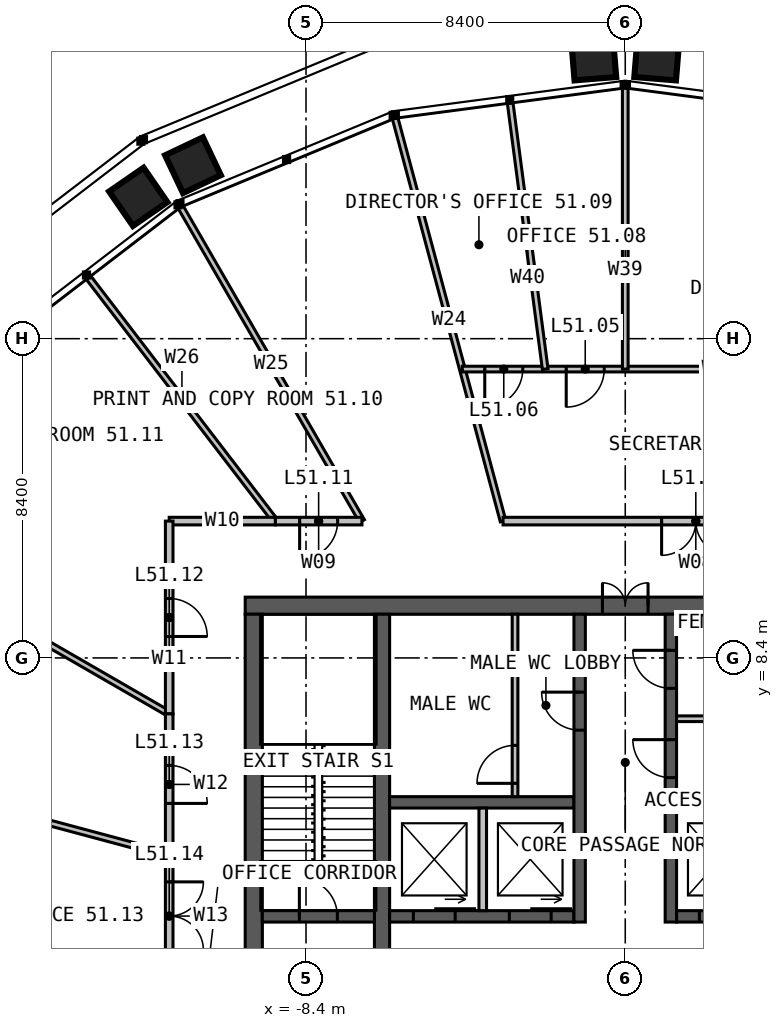
"""IFC4 building model, lengths in metres.
Left out: names, types, materials, properties, quantities, classifications, styles, units other than length and angle.
Written with IfcOpenShell. Run it as: python <this file> out.ifc"""

import sys

from ifc_helpers import new_model, si_unit, direction, frame, frame_2d, origin, place, context, subcontext, project, spatial, rectangle, extrude, element, fill, save


model = new_model("IFC4")
c1 = context("Model", 3, precision=1e-05, world=origin(), true_north=direction((0.0, 1.0)))
c2 = subcontext(c1, "Body", "Model", "MODEL_VIEW")
j1 = project(units=[si_unit("LENGTHUNIT", "METRE"), si_unit("PLANEANGLEUNIT", "RADIAN")], contexts=[c1])
p1 = place(None, origin())
s1 = spatial("IfcSite", under=j1, at=p1, CompositionType="ELEMENT")
p2 = place(p1, origin())
s2 = spatial("IfcBuilding", under=s1, at=p2, CompositionType="ELEMENT")
p3 = place(p2, frame((0.0, 0.0, 211.0)))
s3 = spatial("IfcBuildingStorey", under=s2, at=p3, CompositionType="ELEMENT", Elevation=211.0)
p4 = place(p3, frame((-10.0, 9.775, 0.0), z_axis=(0.0, 0.0, 1.0), x_axis=(1.0, 0.0, 0.0)))
e1 = element("IfcWall", 1, at=p4, inside=s3, PredefinedType="SOLIDWALL", context=c2, shape_type="SweptSolid", body=[
    extrude(rectangle(XDim=20.0, YDim=0.45, at=frame_2d((10.0, 0.0))), origin(), (0.0, 0.0, 1.0), 4.0),
])
p5 = place(p4, frame((9.4, 0.0, 0.0)))
e2 = element("IfcOpeningElement", 2, at=p5, cuts=e1, PredefinedType="OPENING", context=c2, shape_type="SweptSolid", body=[
    extrude(rectangle(XDim=1.2, YDim=2.2, at=frame_2d((0.6, 1.1))), frame((0.0, 0.235, 0.0), z_axis=(0.0, -1.0, 0.0), x_axis=(1.0, 0.0, 0.0)), (0.0, 0.0, 1.0), 0.47),
])
p6 = place(p3, frame((-9.775, 9.55, 0.0), z_axis=(0.0, 0.0, 1.0), x_axis=(0.0, -1.0, 0.0)))
e3 = element("IfcWall", 3, at=p6, inside=s3, PredefinedType="SOLIDWALL", context=c2, shape_type="SweptSolid", body=[
    extrude(rectangle(XDim=19.1, YDim=0.45, at=frame_2d((9.55, 0.0))), origin(), (0.0, 0.0, 1.0), 4.0),
])
p7 = place(p3, frame((-6.4, -9.55, 0.0), z_axis=(0.0, 0.0, 1.0), x_axis=(0.0, 1.0, 0.0)))
e4 = element("IfcWall", 4, at=p7, inside=s3, PredefinedType="SOLIDWALL", context=c2, shape_type="SweptSolid", body=[
    extrude(rectangle(XDim=19.1, YDim=0.4, at=frame_2d((9.55, 0.0))), origin(), (0.0, 0.0, 1.0), 4.0),
])
p8 = place(p7, frame((9.05, 0.0, 0.0)))
e5 = element("IfcOpeningElement", 5, at=p8, cuts=e4, PredefinedType="OPENING", context=c2, shape_type="SweptSolid", body=[
    extrude(rectangle(XDim=1.0, YDim=2.2, at=frame_2d((0.5, 1.1))), frame((0.0, 0.21, 0.0), z_axis=(0.0, -1.0, 0.0), x_axis=(1.0, 0.0, 0.0)), (0.0, 0.0, 1.0), 0.42),
])
p9 = place(p3, frame((-6.2, 1.6, 0.0), z_axis=(0.0, 0.0, 1.0), x_axis=(1.0, 0.0, 0.0)))
e6 = element("IfcWall", 6, at=p9, inside=s3, PredefinedType="SOLIDWALL", context=c2, shape_type="SweptSolid", body=[
    extrude(rectangle(XDim=4.85, YDim=0.3, at=frame_2d((2.425, 0.0))), origin(), (0.0, 0.0, 1.0), 4.0),
])
p10 = place(p9, frame((0.625, 0.0, 0.0)))
e7 = element("IfcOpeningElement", 7, at=p10, cuts=e6, PredefinedType="OPENING", context=c2, shape_type="SweptSolid", body=[
    extrude(rectangle(XDim=1.1, YDim=2.2, at=frame_2d((0.55, 1.1))), frame((0.0, 0.16, 0.0), z_axis=(0.0, -1.0, 0.0), x_axis=(1.0, 0.0, 0.0)), (0.0, 0.0, 1.0), 0.32),
])
p11 = place(p9, frame((3.15, 0.0, 0.0)))
e8 = element("IfcOpeningElement", 8, at=p11, cuts=e6, PredefinedType="OPENING", context=c2, shape_type="SweptSolid", body=[
    extrude(rectangle(XDim=1.1, YDim=2.2, at=frame_2d((0.55, 1.1))), frame((0.0, 0.16, 0.0), z_axis=(0.0, -1.0, 0.0), x_axis=(1.0, 0.0, 0.0)), (0.0, 0.0, 1.0), 0.32),
])
p12 = place(p3, frame((1.35, 1.6, 0.0), z_axis=(0.0, 0.0, 1.0), x_axis=(1.0, 0.0, 0.0)))
e9 = element("IfcWall", 9, at=p12, inside=s3, PredefinedType="SOLIDWALL", context=c2, shape_type="SweptSolid", body=[
    extrude(rectangle(XDim=4.85, YDim=0.3, at=frame_2d((2.425, 0.0))), origin(), (0.0, 0.0, 1.0), 4.0),
])
p13 = place(p12, frame((0.6, 0.0, 0.0)))
e10 = element("IfcOpeningElement", 10, at=p13, cuts=e9, PredefinedType="OPENING", context=c2, shape_type="SweptSolid", body=[
    extrude(rectangle(XDim=1.1, YDim=2.2, at=frame_2d((0.55, 1.1))), frame((0.0, 0.16, 0.0), z_axis=(0.0, -1.0, 0.0), x_axis=(1.0, 0.0, 0.0)), (0.0, 0.0, 1.0), 0.32),
])
p14 = place(p12, frame((3.125, 0.0, 0.0)))
e11 = element("IfcOpeningElement", 11, at=p14, cuts=e9, PredefinedType="OPENING", context=c2, shape_type="SweptSolid", body=[
    extrude(rectangle(XDim=1.1, YDim=2.2, at=frame_2d((0.55, 1.1))), frame((0.0, 0.16, 0.0), z_axis=(0.0, -1.0, 0.0), x_axis=(1.0, 0.0, 0.0)), (0.0, 0.0, 1.0), 0.32),
])
for number, where, z_axis, x_axis in (
    (12, (-6.2, 4.6, 0.0), (0.0, 0.0, 1.0), (1.0, 0.0, 0.0)),
    (13, (1.35, 4.6, 0.0), (0.0, 0.0, 1.0), (1.0, 0.0, 0.0)),
):
    element("IfcWall", number, at=place(p3, frame(where, z_axis=z_axis, x_axis=x_axis)), inside=s3, PredefinedType="SOLIDWALL", context=c2, shape_type="SweptSolid", body=[
        extrude(rectangle(XDim=4.85, YDim=0.3, at=frame_2d((2.425, 0.0))), origin(), (0.0, 0.0, 1.0), 4.0),
    ])
p15 = place(p3, frame((-1.2, 1.45, 0.0), z_axis=(0.0, 0.0, 1.0), x_axis=(0.0, 1.0, 0.0)))
e14 = element("IfcWall", 14, at=p15, inside=s3, PredefinedType="SOLIDWALL", context=c2, shape_type="SweptSolid", body=[
    extrude(rectangle(XDim=8.1, YDim=0.3, at=frame_2d((4.05, 0.0))), origin(), (0.0, 0.0, 1.0), 4.0),
])
p16 = place(p15, frame((5.05, 0.0, 0.0)))
e15 = element("IfcOpeningElement", 15, at=p16, cuts=e14, PredefinedType="OPENING", context=c2, shape_type="SweptSolid", body=[
    extrude(rectangle(XDim=1.0, YDim=2.2, at=frame_2d((0.5, 1.1))), frame((0.0, 0.16, 0.0), z_axis=(0.0, -1.0, 0.0), x_axis=(1.0, 0.0, 0.0)), (0.0, 0.0, 1.0), 0.32),
])
p17 = place(p3, frame((1.2, 1.45, 0.0), z_axis=(0.0, 0.0, 1.0), x_axis=(0.0, 1.0, 0.0)))
e16 = element("IfcWall", 16, at=p17, inside=s3, PredefinedType="SOLIDWALL", context=c2, shape_type="SweptSolid", body=[
    extrude(rectangle(XDim=8.1, YDim=0.3, at=frame_2d((4.05, 0.0))), origin(), (0.0, 0.0, 1.0), 4.0),
])
p18 = place(p17, frame((3.8, 0.0, 0.0)))
e17 = element("IfcOpeningElement", 17, at=p18, cuts=e16, PredefinedType="OPENING", context=c2, shape_type="SweptSolid", body=[
    extrude(rectangle(XDim=1.0, YDim=2.2, at=frame_2d((0.5, 1.1))), frame((0.0, 0.16, 0.0), z_axis=(0.0, -1.0, 0.0), x_axis=(1.0, 0.0, 0.0)), (0.0, 0.0, 1.0), 0.32),
])
p19 = place(p17, frame((6.15, 0.0, 0.0)))
e18 = element("IfcOpeningElement", 18, at=p19, cuts=e16, PredefinedType="OPENING", context=c2, shape_type="SweptSolid", body=[
    extrude(rectangle(XDim=1.0, YDim=2.2, at=frame_2d((0.5, 1.1))), frame((0.0, 0.16, 0.0), z_axis=(0.0, -1.0, 0.0), x_axis=(1.0, 0.0, 0.0)), (0.0, 0.0, 1.0), 0.32),
])
p20 = place(p3, frame((-9.55, 1.6, 0.0), z_axis=(0.0, 0.0, 1.0), x_axis=(1.0, 0.0, 0.0)))
e19 = element("IfcWall", 19, at=p20, inside=s3, PredefinedType="SOLIDWALL", context=c2, shape_type="SweptSolid", body=[
    extrude(rectangle(XDim=2.95, YDim=0.3, at=frame_2d((1.475, 0.0))), origin(), (0.0, 0.0, 1.0), 4.0),
])
p21 = place(p20, frame((0.975, 0.0, 0.0)))
e20 = element("IfcOpeningElement", 20, at=p21, cuts=e19, PredefinedType="OPENING", context=c2, shape_type="SweptSolid", body=[
    extrude(rectangle(XDim=1.0, YDim=2.2, at=frame_2d((0.5, 1.1))), frame((0.0, 0.16, 0.0), z_axis=(0.0, -1.0, 0.0), x_axis=(1.0, 0.0, 0.0)), (0.0, 0.0, 1.0), 0.32),
])
p22 = place(p3, frame((-3.75, 1.75, 0.0), z_axis=(0.0, 0.0, 1.0), x_axis=(0.0, 1.0, 0.0)))
e21 = element("IfcWall", 21, at=p22, inside=s3, PredefinedType="SOLIDWALL", context=c2, shape_type="SweptSolid", body=[
    extrude(rectangle(XDim=2.7, YDim=0.2, at=frame_2d((1.35, 0.0))), origin(), (0.0, 0.0, 1.0), 3.75),
])
p23 = place(p3, frame((1.35, 6.8, 0.0), z_axis=(0.0, 0.0, 1.0), x_axis=(1.0, 0.0, 0.0)))
e22 = element("IfcWall", 22, at=p23, inside=s3, PredefinedType="PARTITIONING", context=c2, shape_type="SweptSolid", body=[
    extrude(rectangle(XDim=4.85, YDim=0.15, at=frame_2d((2.425, 0.0))), origin(), (0.0, 0.0, 1.0), 3.75),
])
p24 = place(p23, frame((3.15, 0.0, 0.0)))
e23 = element("IfcOpeningElement", 23, at=p24, cuts=e22, PredefinedType="OPENING", context=c2, shape_type="SweptSolid", body=[
    extrude(rectangle(XDim=0.9, YDim=2.2, at=frame_2d((0.45, 1.1))), frame((0.0, 0.085, 0.0), z_axis=(0.0, -1.0, 0.0), x_axis=(1.0, 0.0, 0.0)), (0.0, 0.0, 1.0), 0.17),
])
p25 = place(p3, frame((-2.9, 4.75, 0.0), z_axis=(0.0, 0.0, 1.0), x_axis=(0.0, 1.0, 0.0)))
e24 = element("IfcWall", 24, at=p25, inside=s3, PredefinedType="PARTITIONING", context=c2, shape_type="SweptSolid", body=[
    extrude(rectangle(XDim=4.8, YDim=0.15, at=frame_2d((2.4, 0.0))), origin(), (0.0, 0.0, 1.0), 3.75),
])
p26 = place(p25, frame((0.35, 0.0, 0.0)))
e25 = element("IfcOpeningElement", 25, at=p26, cuts=e24, PredefinedType="OPENING", context=c2, shape_type="SweptSolid", body=[
    extrude(rectangle(XDim=1.0, YDim=2.2, at=frame_2d((0.5, 1.1))), frame((0.0, 0.085, 0.0), z_axis=(0.0, -1.0, 0.0), x_axis=(1.0, 0.0, 0.0)), (0.0, 0.0, 1.0), 0.17),
])
p27 = place(p3, frame((-3.215, 12.0, 0.0), z_axis=(0.0, 0.0, 1.0), x_axis=(-0.258822822076, 0.965924814244, 0.0)))
e26 = element("IfcWall", 26, at=p27, inside=s3, PredefinedType="PARTITIONING", context=c2, shape_type="SweptSolid", body=[
    extrude(rectangle(XDim=10.974, YDim=0.15, at=frame_2d((5.487, 0.0))), origin(), (0.0, 0.0, 1.0), 2.79),
])
p28 = place(p3, frame((-6.928, 12.0, 0.0), z_axis=(0.0, 0.0, 1.0), x_axis=(-0.50000302246, 0.866023658759, 0.0)))
e27 = element("IfcWall", 27, at=p28, inside=s3, PredefinedType="PARTITIONING", context=c2, shape_type="SweptSolid", body=[
    extrude(rectangle(XDim=9.541, YDim=0.15, at=frame_2d((4.771, 0.0))), origin(), (0.0, 0.0, 1.0), 2.79),
])
p29 = place(p3, frame((-9.208, 12.0, 0.0), z_axis=(0.0, 0.0, 1.0), x_axis=(-0.608757248883, 0.793356547797, 0.0)))
e28 = element("IfcWall", 28, at=p29, inside=s3, PredefinedType="PARTITIONING", context=c2, shape_type="SweptSolid", body=[
    extrude(rectangle(XDim=8.072, YDim=0.15, at=frame_2d((4.036, 0.0))), origin(), (0.0, 0.0, 1.0), 2.79),
])
p30 = place(p3, frame((-12.0, 6.928, 0.0), z_axis=(0.0, 0.0, 1.0), x_axis=(-0.866023658759, 0.50000302246, 0.0)))
e29 = element("IfcWall", 29, at=p30, inside=s3, PredefinedType="PARTITIONING", context=c2, shape_type="SweptSolid", body=[
    extrude(rectangle(XDim=9.541, YDim=0.15, at=frame_2d((4.771, 0.0))), origin(), (0.0, 0.0, 1.0), 2.79),
])
p31 = place(p3, frame((-12.0, 3.215, 0.0), z_axis=(0.0, 0.0, 1.0), x_axis=(-0.965924814244, 0.258822822076, 0.0)))
e30 = element("IfcWall", 30, at=p31, inside=s3, PredefinedType="PARTITIONING", context=c2, shape_type="SweptSolid", body=[
    extrude(rectangle(XDim=10.974, YDim=0.15, at=frame_2d((5.487, 0.0))), origin(), (0.0, 0.0, 1.0), 2.79),
])
p32 = place(p3, frame((9.238, 16.0, 0.0), z_axis=(0.0, 0.0, 1.0), x_axis=(-1.0, 0.0, 0.0)))
e31 = element("IfcWall", 31, at=p32, inside=s3, PredefinedType="PARTITIONING", context=c2, shape_type="SweptSolid", body=[
    extrude(rectangle(XDim=13.525, YDim=0.15, at=frame_2d((6.762, 0.0))), origin(), (0.0, 0.0, 1.0), 2.79),
])
p33 = place(p32, frame((3.719, 0.0, 0.0)))
e32 = element("IfcOpeningElement", 32, at=p33, cuts=e31, PredefinedType="OPENING", context=c2, shape_type="SweptSolid", body=[
    extrude(rectangle(XDim=1.8, YDim=2.2, at=frame_2d((0.9, 1.1))), frame((0.0, 0.085, 0.0), z_axis=(0.0, -1.0, 0.0), x_axis=(1.0, 0.0, 0.0)), (0.0, 0.0, 1.0), 0.17),
])
p34 = place(p32, frame((9.791, 0.0, 0.0)))
e33 = element("IfcOpeningElement", 33, at=p34, cuts=e31, PredefinedType="OPENING", context=c2, shape_type="SweptSolid", body=[
    extrude(rectangle(XDim=1.0, YDim=2.2, at=frame_2d((0.5, 1.1))), frame((0.0, 0.085, 0.0), z_axis=(0.0, -1.0, 0.0), x_axis=(1.0, 0.0, 0.0)), (0.0, 0.0, 1.0), 0.17),
])
p35 = place(p32, frame((11.934, 0.0, 0.0)))
e34 = element("IfcOpeningElement", 34, at=p35, cuts=e31, PredefinedType="OPENING", context=c2, shape_type="SweptSolid", body=[
    extrude(rectangle(XDim=1.0, YDim=2.2, at=frame_2d((0.5, 1.1))), frame((0.0, 0.085, 0.0), z_axis=(0.0, -1.0, 0.0), x_axis=(1.0, 0.0, 0.0)), (0.0, 0.0, 1.0), 0.17),
])
p36 = place(p3, frame((0.0, 16.0, 0.0), z_axis=(0.0, 0.0, 1.0), x_axis=(0.0, 1.0, 0.0)))
e35 = element("IfcWall", 35, at=p36, inside=s3, PredefinedType="PARTITIONING", context=c2, shape_type="SweptSolid", body=[
    extrude(rectangle(XDim=7.397, YDim=0.15, at=frame_2d((3.699, 0.0))), origin(), (0.0, 0.0, 1.0), 2.79),
])
p37 = place(p3, frame((-2.106, 16.0, 0.0), z_axis=(0.0, 0.0, 1.0), x_axis=(-0.130527875205, 0.991444639803, 0.0)))
e36 = element("IfcWall", 36, at=p37, inside=s3, PredefinedType="PARTITIONING", context=c2, shape_type="SweptSolid", body=[
    extrude(rectangle(XDim=7.059, YDim=0.15, at=frame_2d((3.529, 0.0))), origin(), (0.0, 0.0, 1.0), 2.79),
])
p38 = place(p3, frame((6.928, 12.0, 0.0), z_axis=(0.0, 0.0, 1.0), x_axis=(-1.0, 0.0, 0.0)))
e37 = element("IfcWall", 37, at=p38, inside=s3, PredefinedType="PARTITIONING", context=c2, shape_type="SweptSolid", body=[
    extrude(rectangle(XDim=10.144, YDim=0.2, at=frame_2d((5.072, 0.0))), origin(), (0.0, 0.0, 1.0), 3.8),
])
p39 = place(p38, frame((4.172, 0.0, 0.0)))
e38 = element("IfcOpeningElement", 38, at=p39, cuts=e37, PredefinedType="OPENING", context=c2, shape_type="SweptSolid", body=[
    extrude(rectangle(XDim=1.8, YDim=2.2, at=frame_2d((0.9, 1.1))), frame((0.0, 0.11, 0.0), z_axis=(0.0, -1.0, 0.0), x_axis=(1.0, 0.0, 0.0)), (0.0, 0.0, 1.0), 0.22),
])
p40 = place(p3, frame((-6.928, 12.0, 0.0), z_axis=(0.0, 0.0, 1.0), x_axis=(-1.0, 0.0, 0.0)))
e39 = element("IfcWall", 39, at=p40, inside=s3, PredefinedType="PARTITIONING", context=c2, shape_type="SweptSolid", body=[
    extrude(rectangle(XDim=2.28, YDim=0.2, at=frame_2d((1.14, 0.0))), origin(), (0.0, 0.0, 1.0), 3.8),
])
p41 = place(p40, frame((0.64, 0.0, 0.0)))
e40 = element("IfcOpeningElement", 40, at=p41, cuts=e39, PredefinedType="OPENING", context=c2, shape_type="SweptSolid", body=[
    extrude(rectangle(XDim=1.0, YDim=2.2, at=frame_2d((0.5, 1.1))), frame((0.0, 0.11, 0.0), z_axis=(0.0, -1.0, 0.0), x_axis=(1.0, 0.0, 0.0)), (0.0, 0.0, 1.0), 0.22),
])
p42 = place(p3, frame((-9.208, 12.0, 0.0), z_axis=(0.0, 0.0, 1.0), x_axis=(-1.0, 0.0, 0.0)))
e41 = element("IfcWall", 41, at=p42, inside=s3, PredefinedType="PARTITIONING", context=c2, shape_type="SweptSolid", body=[
    extrude(rectangle(XDim=2.792, YDim=0.2, at=frame_2d((1.396, 0.0))), origin(), (0.0, 0.0, 1.0), 3.8),
])
p43 = place(p3, frame((-12.0, 12.0, 0.0), z_axis=(0.0, 0.0, 1.0), x_axis=(0.0, -1.0, 0.0)))
e42 = element("IfcWall", 42, at=p43, inside=s3, PredefinedType="PARTITIONING", context=c2, shape_type="SweptSolid", body=[
    extrude(rectangle(XDim=5.072, YDim=0.2, at=frame_2d((2.536, 0.0))), origin(), (0.0, 0.0, 1.0), 3.8),
])
p44 = place(p43, frame((2.036, 0.0, 0.0)))
e43 = element("IfcOpeningElement", 43, at=p44, cuts=e42, PredefinedType="OPENING", context=c2, shape_type="SweptSolid", body=[
    extrude(rectangle(XDim=1.0, YDim=2.2, at=frame_2d((0.5, 1.1))), frame((0.0, 0.11, 0.0), z_axis=(0.0, -1.0, 0.0), x_axis=(1.0, 0.0, 0.0)), (0.0, 0.0, 1.0), 0.22),
])
p45 = place(p3, frame((-12.0, 6.928, 0.0), z_axis=(0.0, 0.0, 1.0), x_axis=(0.0, -1.0, 0.0)))
e44 = element("IfcWall", 44, at=p45, inside=s3, PredefinedType="PARTITIONING", context=c2, shape_type="SweptSolid", body=[
    extrude(rectangle(XDim=3.713, YDim=0.2, at=frame_2d((1.856, 0.0))), origin(), (0.0, 0.0, 1.0), 3.8),
])
p46 = place(p45, frame((1.356, 0.0, 0.0)))
e45 = element("IfcOpeningElement", 45, at=p46, cuts=e44, PredefinedType="OPENING", context=c2, shape_type="SweptSolid", body=[
    extrude(rectangle(XDim=1.0, YDim=2.2, at=frame_2d((0.5, 1.1))), frame((0.0, 0.11, 0.0), z_axis=(0.0, -1.0, 0.0), x_axis=(1.0, 0.0, 0.0)), (0.0, 0.0, 1.0), 0.22),
])
p47 = place(p3, frame((-12.0, 3.215, 0.0), z_axis=(0.0, 0.0, 1.0), x_axis=(0.0, -1.0, 0.0)))
e46 = element("IfcWall", 46, at=p47, inside=s3, PredefinedType="PARTITIONING", context=c2, shape_type="SweptSolid", body=[
    extrude(rectangle(XDim=3.215, YDim=0.2, at=frame_2d((1.608, 0.0))), origin(), (0.0, 0.0, 1.0), 3.8),
])
p48 = place(p47, frame((0.708, 0.0, 0.0)))
e47 = element("IfcOpeningElement", 47, at=p48, cuts=e46, PredefinedType="OPENING", context=c2, shape_type="SweptSolid", body=[
    extrude(rectangle(XDim=1.8, YDim=2.2, at=frame_2d((0.9, 1.1))), frame((0.0, 0.11, 0.0), z_axis=(0.0, -1.0, 0.0), x_axis=(1.0, 0.0, 0.0)), (0.0, 0.0, 1.0), 0.22),
])
p49 = place(p5, origin())
e48 = element("IfcDoor", 48, at=p49, inside=s3, OperationType="DOUBLE_DOOR_SINGLE_SWING", PredefinedType="DOOR", context=c2, shape_type="SweptSolid", body=[
    extrude(rectangle(XDim=1.2, YDim=2.2, at=frame_2d((0.6, 1.1))), frame((0.0, 0.025, 0.0), z_axis=(0.0, -1.0, 0.0), x_axis=(1.0, 0.0, 0.0)), (0.0, 0.0, 1.0), 0.05),
])
fill(e2, e48)
p50 = place(p21, origin())
e49 = element("IfcDoor", 49, at=p50, inside=s3, OperationType="SINGLE_SWING_LEFT", PredefinedType="DOOR", context=c2, shape_type="SweptSolid", body=[
    extrude(rectangle(XDim=1.0, YDim=2.2, at=frame_2d((0.5, 1.1))), frame((0.0, 0.025, 0.0), z_axis=(0.0, -1.0, 0.0), x_axis=(1.0, 0.0, 0.0)), (0.0, 0.0, 1.0), 0.05),
])
fill(e20, e49)
p51 = place(p16, origin())
e50 = element("IfcDoor", 50, at=p51, inside=s3, OperationType="SINGLE_SWING_RIGHT", PredefinedType="DOOR", context=c2, shape_type="SweptSolid", body=[
    extrude(rectangle(XDim=1.0, YDim=2.2, at=frame_2d((0.5, 1.1))), frame((0.0, 0.025, 0.0), z_axis=(0.0, -1.0, 0.0), x_axis=(1.0, 0.0, 0.0)), (0.0, 0.0, 1.0), 0.05),
])
fill(e15, e50)
p52 = place(p18, origin())
e51 = element("IfcDoor", 51, at=p52, inside=s3, OperationType="SINGLE_SWING_RIGHT", PredefinedType="DOOR", context=c2, shape_type="SweptSolid", body=[
    extrude(rectangle(XDim=1.0, YDim=2.2, at=frame_2d((0.5, 1.1))), frame((0.0, 0.025, 0.0), z_axis=(0.0, -1.0, 0.0), x_axis=(1.0, 0.0, 0.0)), (0.0, 0.0, 1.0), 0.05),
])
fill(e17, e51)
p53 = place(p19, origin())
e52 = element("IfcDoor", 52, at=p53, inside=s3, OperationType="SINGLE_SWING_RIGHT", PredefinedType="DOOR", context=c2, shape_type="SweptSolid", body=[
    extrude(rectangle(XDim=1.0, YDim=2.2, at=frame_2d((0.5, 1.1))), frame((0.0, 0.025, 0.0), z_axis=(0.0, -1.0, 0.0), x_axis=(1.0, 0.0, 0.0)), (0.0, 0.0, 1.0), 0.05),
])
fill(e18, e52)
p54 = place(p26, origin())
e53 = element("IfcDoor", 53, at=p54, inside=s3, OperationType="SINGLE_SWING_LEFT", PredefinedType="DOOR", context=c2, shape_type="SweptSolid", body=[
    extrude(rectangle(XDim=1.0, YDim=2.2, at=frame_2d((0.5, 1.1))), frame((0.0, 0.025, 0.0), z_axis=(0.0, -1.0, 0.0), x_axis=(1.0, 0.0, 0.0)), (0.0, 0.0, 1.0), 0.05),
])
fill(e25, e53)
p55 = place(p10, origin())
e54 = element("IfcDoor", 54, at=p55, inside=s3, OperationType="SLIDING_TO_LEFT", PredefinedType="DOOR", context=c2, shape_type="SweptSolid", body=[
    extrude(rectangle(XDim=1.1, YDim=2.2, at=frame_2d((0.55, 1.1))), frame((0.0, 0.025, 0.0), z_axis=(0.0, -1.0, 0.0), x_axis=(1.0, 0.0, 0.0)), (0.0, 0.0, 1.0), 0.05),
])
fill(e7, e54)
p56 = place(p11, origin())
e55 = element("IfcDoor", 55, at=p56, inside=s3, OperationType="SLIDING_TO_LEFT", PredefinedType="DOOR", context=c2, shape_type="SweptSolid", body=[
    extrude(rectangle(XDim=1.1, YDim=2.2, at=frame_2d((0.55, 1.1))), frame((0.0, 0.025, 0.0), z_axis=(0.0, -1.0, 0.0), x_axis=(1.0, 0.0, 0.0)), (0.0, 0.0, 1.0), 0.05),
])
fill(e8, e55)
p57 = place(p13, origin())
e56 = element("IfcDoor", 56, at=p57, inside=s3, OperationType="SLIDING_TO_LEFT", PredefinedType="DOOR", context=c2, shape_type="SweptSolid", body=[
    extrude(rectangle(XDim=1.1, YDim=2.2, at=frame_2d((0.55, 1.1))), frame((0.0, 0.025, 0.0), z_axis=(0.0, -1.0, 0.0), x_axis=(1.0, 0.0, 0.0)), (0.0, 0.0, 1.0), 0.05),
])
fill(e10, e56)
p58 = place(p34, origin())
e57 = element("IfcDoor", 57, at=p58, inside=s3, OperationType="SINGLE_SWING_RIGHT", PredefinedType="DOOR", context=c2, shape_type="SweptSolid", body=[
    extrude(rectangle(XDim=1.0, YDim=2.2, at=frame_2d((0.5, 1.1))), frame((0.0, 0.025, 0.0), z_axis=(0.0, -1.0, 0.0), x_axis=(1.0, 0.0, 0.0)), (0.0, 0.0, 1.0), 0.05),
])
fill(e33, e57)
p59 = place(p35, origin())
e58 = element("IfcDoor", 58, at=p59, inside=s3, OperationType="SINGLE_SWING_RIGHT", PredefinedType="DOOR", context=c2, shape_type="SweptSolid", body=[
    extrude(rectangle(XDim=1.0, YDim=2.2, at=frame_2d((0.5, 1.1))), frame((0.0, 0.025, 0.0), z_axis=(0.0, -1.0, 0.0), x_axis=(1.0, 0.0, 0.0)), (0.0, 0.0, 1.0), 0.05),
])
fill(e34, e58)
p60 = place(p39, origin())
e59 = element("IfcDoor", 59, at=p60, inside=s3, OperationType="DOUBLE_DOOR_SINGLE_SWING", PredefinedType="DOOR", context=c2, shape_type="SweptSolid", body=[
    extrude(rectangle(XDim=1.8, YDim=2.2, at=frame_2d((0.9, 1.1))), frame((0.0, 0.025, 0.0), z_axis=(0.0, -1.0, 0.0), x_axis=(1.0, 0.0, 0.0)), (0.0, 0.0, 1.0), 0.05),
])
fill(e38, e59)
p61 = place(p41, origin())
e60 = element("IfcDoor", 60, at=p61, inside=s3, OperationType="SINGLE_SWING_RIGHT", PredefinedType="DOOR", context=c2, shape_type="SweptSolid", body=[
    extrude(rectangle(XDim=1.0, YDim=2.2, at=frame_2d((0.5, 1.1))), frame((0.0, 0.025, 0.0), z_axis=(0.0, -1.0, 0.0), x_axis=(1.0, 0.0, 0.0)), (0.0, 0.0, 1.0), 0.05),
])
fill(e40, e60)
p62 = place(p44, origin())
e61 = element("IfcDoor", 61, at=p62, inside=s3, OperationType="SINGLE_SWING_RIGHT", PredefinedType="DOOR", context=c2, shape_type="SweptSolid", body=[
    extrude(rectangle(XDim=1.0, YDim=2.2, at=frame_2d((0.5, 1.1))), frame((0.0, 0.025, 0.0), z_axis=(0.0, -1.0, 0.0), x_axis=(1.0, 0.0, 0.0)), (0.0, 0.0, 1.0), 0.05),
])
fill(e43, e61)
p63 = place(p46, origin())
e62 = element("IfcDoor", 62, at=p63, inside=s3, OperationType="SINGLE_SWING_RIGHT", PredefinedType="DOOR", context=c2, shape_type="SweptSolid", body=[
    extrude(rectangle(XDim=1.0, YDim=2.2, at=frame_2d((0.5, 1.1))), frame((0.0, 0.025, 0.0), z_axis=(0.0, -1.0, 0.0), x_axis=(1.0, 0.0, 0.0)), (0.0, 0.0, 1.0), 0.05),
])
fill(e45, e62)
p64 = place(p48, origin())
e63 = element("IfcDoor", 63, at=p64, inside=s3, OperationType="DOUBLE_DOOR_SINGLE_SWING", PredefinedType="DOOR", context=c2, shape_type="SweptSolid", body=[
    extrude(rectangle(XDim=1.8, YDim=2.2, at=frame_2d((0.9, 1.1))), frame((0.0, 0.025, 0.0), z_axis=(0.0, -1.0, 0.0), x_axis=(1.0, 0.0, 0.0)), (0.0, 0.0, 1.0), 0.05),
])
fill(e47, e63)
save(model, sys.argv[1])
